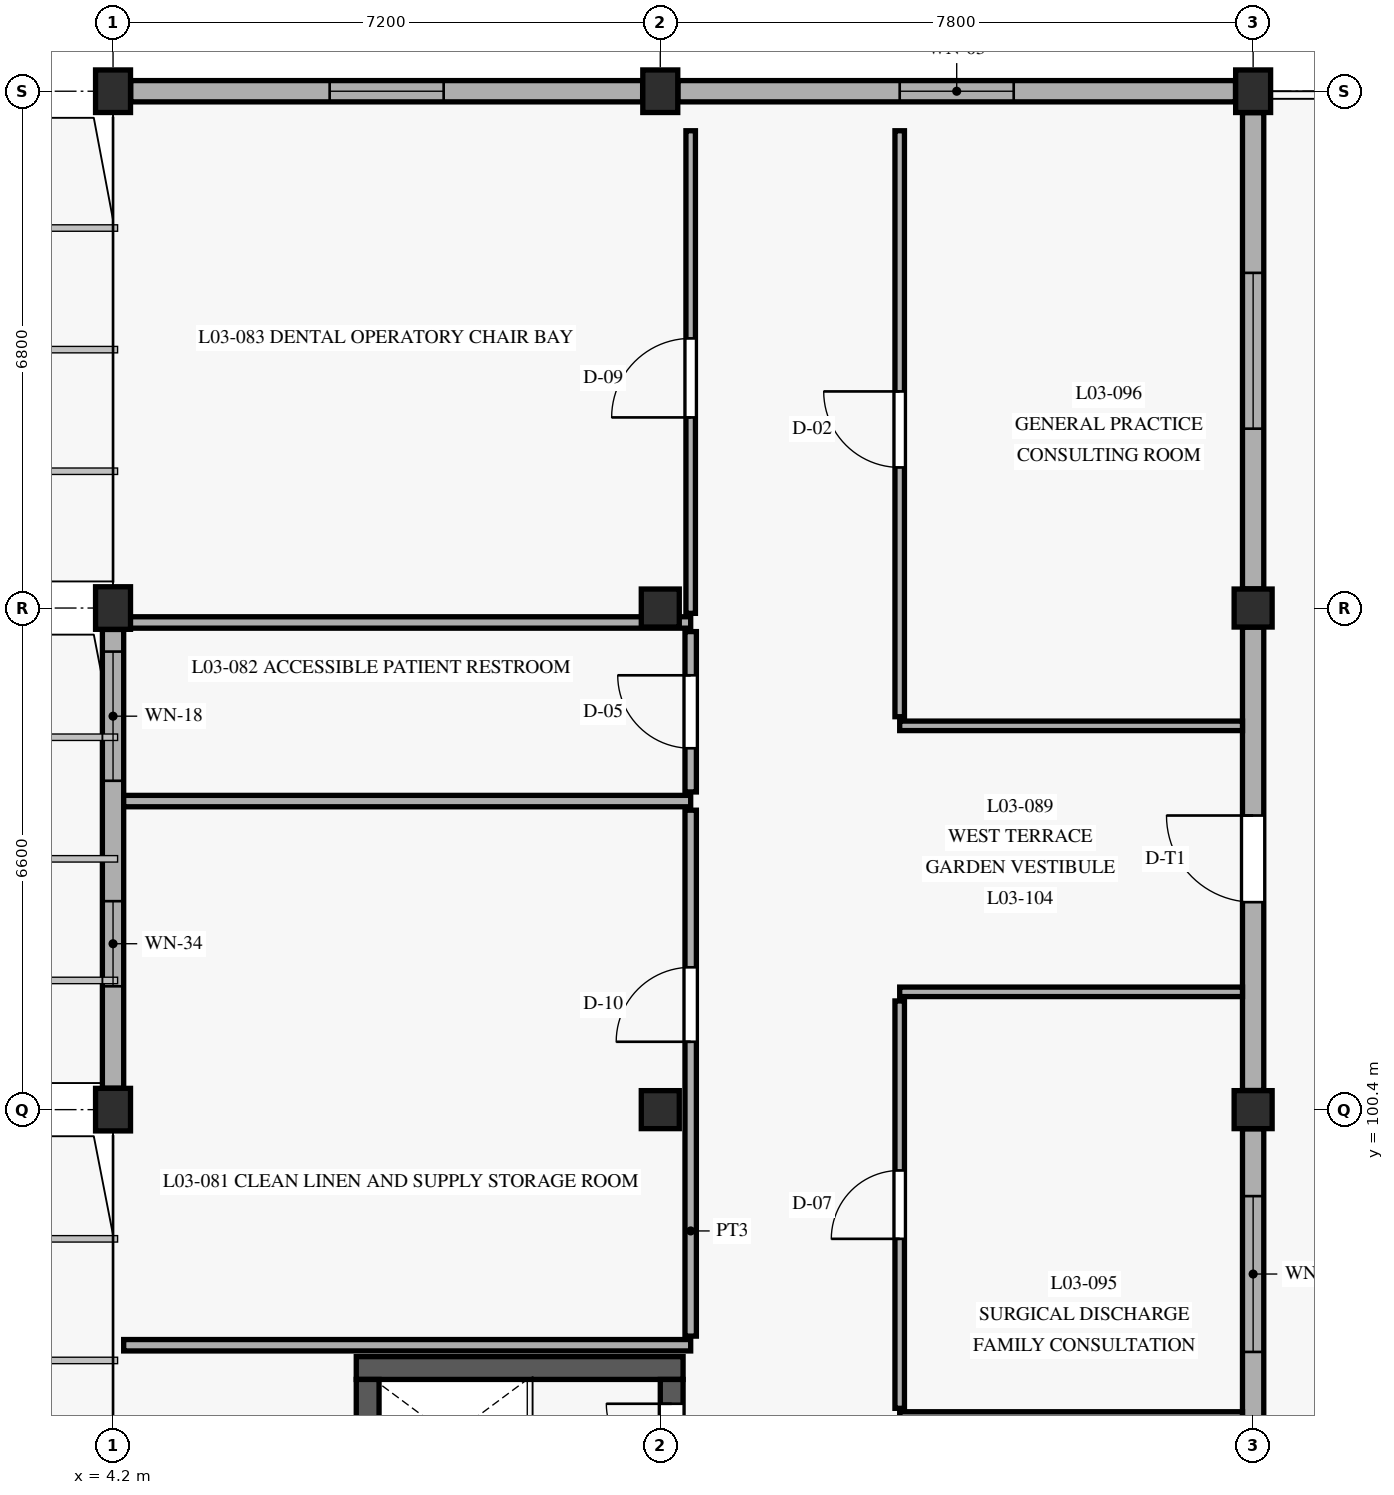
"""IFC4 building model, lengths in metres.
Left out: names, types, materials, properties, quantities, classifications, styles, units other than length and angle.
Written with IfcOpenShell. Run it as: python <this file> out.ifc"""

import sys

from ifc_helpers import new_model, si_unit, direction, frame, frame_2d, origin, origin_with_axes, origin_2d, place, context, subcontext, project, spatial, rectangle, extrude, element, fill, save


model = new_model("IFC4")
c1 = context("Model", 3, precision=1e-05, world=origin(), true_north=direction((0.0, 1.0)))
c2 = subcontext(c1, "Body", "Model", "MODEL_VIEW")
j1 = project(units=[si_unit("LENGTHUNIT", "METRE"), si_unit("PLANEANGLEUNIT", "RADIAN")], contexts=[c1])
p1 = place(None, origin())
s1 = spatial("IfcSite", under=j1, at=p1, CompositionType="ELEMENT")
p2 = place(p1, origin())
s2 = spatial("IfcBuilding", under=s1, at=p2, CompositionType="ELEMENT")
p3 = place(p2, frame((0.0, 0.0, 9.3)))
s3 = spatial("IfcBuildingStorey", under=s2, at=p3, CompositionType="ELEMENT", Elevation=9.3)
for number, where, z_axis, x_axis in (
    (1, (4.2, 100.4, 0.0), (0.0, 0.0, 1.0), (1.0, 0.0, 0.0)),
    (2, (4.2, 107.0, 0.0), (0.0, 0.0, 1.0), (1.0, 0.0, 0.0)),
    (3, (4.2, 113.8, 0.0), (0.0, 0.0, 1.0), (1.0, 0.0, 0.0)),
):
    element("IfcColumn", number, at=place(p3, frame(where, z_axis=z_axis, x_axis=x_axis)), inside=s3, PredefinedType="COLUMN", context=c2, shape_type="SweptSolid", body=[
        extrude(rectangle(XDim=0.46, YDim=0.56, at=origin_2d()), origin(), (0.0, 0.0, 1.0), 4.2),
    ])
for number, where, z_axis, x_axis in (
    (4, (11.4, 100.4, 0.0), (0.0, 0.0, 1.0), (1.0, 0.0, 0.0)),
    (5, (11.4, 107.0, 0.0), (0.0, 0.0, 1.0), (1.0, 0.0, 0.0)),
):
    element("IfcColumn", number, at=place(p3, frame(where, z_axis=z_axis, x_axis=x_axis)), inside=s3, PredefinedType="COLUMN", context=c2, shape_type="SweptSolid", body=[
        extrude(rectangle(XDim=0.5, YDim=0.5, at=origin_2d()), origin(), (0.0, 0.0, 1.0), 4.2),
    ])
p4 = place(p3, frame((11.4, 113.8, 0.0), z_axis=(0.0, 0.0, 1.0), x_axis=(1.0, 0.0, 0.0)))
e6 = element("IfcColumn", 6, at=p4, inside=s3, PredefinedType="COLUMN", context=c2, shape_type="SweptSolid", body=[
    extrude(rectangle(XDim=0.46, YDim=0.56, at=origin_2d()), origin(), (0.0, 0.0, 1.0), 4.2),
])
for number, where, z_axis, x_axis in (
    (7, (19.2, 100.4, 0.0), (0.0, 0.0, 1.0), (1.0, 0.0, 0.0)),
    (8, (19.2, 107.0, 0.0), (0.0, 0.0, 1.0), (1.0, 0.0, 0.0)),
):
    element("IfcColumn", number, at=place(p3, frame(where, z_axis=z_axis, x_axis=x_axis)), inside=s3, PredefinedType="COLUMN", context=c2, shape_type="SweptSolid", body=[
        extrude(rectangle(XDim=0.5, YDim=0.5, at=origin_2d()), origin(), (0.0, 0.0, 1.0), 4.2),
    ])
p5 = place(p3, frame((19.2, 113.8, 0.0), z_axis=(0.0, 0.0, 1.0), x_axis=(1.0, 0.0, 0.0)))
e9 = element("IfcColumn", 9, at=p5, inside=s3, PredefinedType="COLUMN", context=c2, shape_type="SweptSolid", body=[
    extrude(rectangle(XDim=0.46, YDim=0.56, at=origin_2d()), origin(), (0.0, 0.0, 1.0), 4.2),
])
p6 = place(p3, frame((11.7, 97.0, 0.0), z_axis=(0.0, 0.0, 1.0), x_axis=(-1.0, 0.0, 0.0)))
e10 = element("IfcWall", 10, at=p6, inside=s3, PredefinedType="SHEAR", context=c2, shape_type="SweptSolid", body=[
    extrude(rectangle(XDim=4.3, YDim=0.3, at=frame_2d((2.15, 0.0))), origin(), (0.0, 0.0, 1.0), 3.9),
])
p7 = place(p3, frame((7.55, 96.85, 0.0), z_axis=(0.0, 0.0, 1.0), x_axis=(0.0, -1.0, 0.0)))
e11 = element("IfcWall", 11, at=p7, inside=s3, PredefinedType="SHEAR", context=c2, shape_type="SweptSolid", body=[
    extrude(rectangle(XDim=8.7, YDim=0.3, at=frame_2d((4.35, 0.0))), origin(), (0.0, 0.0, 1.0), 3.9),
])
p8 = place(p3, frame((11.55, 88.15, 0.0), z_axis=(0.0, 0.0, 1.0), x_axis=(0.0, 1.0, 0.0)))
e12 = element("IfcWall", 12, at=p8, inside=s3, PredefinedType="SHEAR", context=c2, shape_type="SweptSolid", body=[
    extrude(rectangle(XDim=8.7, YDim=0.3, at=frame_2d((4.35, 0.0))), origin(), (0.0, 0.0, 1.0), 3.9),
])
p9 = place(p8, frame((0.2, 0.0, 0.0)))
e13 = element("IfcOpeningElement", 13, at=p9, cuts=e12, PredefinedType="OPENING", context=c2, shape_type="SweptSolid", body=[
    extrude(rectangle(XDim=1.1, YDim=2.2, at=frame_2d((0.55, 1.1))), frame((0.0, 0.16, 0.0), z_axis=(0.0, -1.0, 0.0), x_axis=(1.0, 0.0, 0.0)), (0.0, 0.0, 1.0), 0.32),
])
p10 = place(p8, frame((7.52, 0.0, 0.0)))
e14 = element("IfcOpeningElement", 14, at=p10, cuts=e12, PredefinedType="OPENING", context=c2, shape_type="SweptSolid", body=[
    extrude(rectangle(XDim=0.86, YDim=2.05, at=frame_2d((0.43, 1.025))), frame((0.0, 0.16, 0.0), z_axis=(0.0, -1.0, 0.0), x_axis=(1.0, 0.0, 0.0)), (0.0, 0.0, 1.0), 0.32),
])
p11 = place(p3, frame((4.2, 106.718, 0.0), z_axis=(0.0, 0.0, 1.0), x_axis=(0.0, -1.0, 0.0)))
e15 = element("IfcWall", 15, at=p11, inside=s3, PredefinedType="SOLIDWALL", context=c2, shape_type="SweptSolid", body=[
    extrude(rectangle(XDim=6.036, YDim=0.28, at=frame_2d((3.018, 0.0))), origin(), (0.0, 0.0, 1.0), 3.48),
])
p12 = place(p11, frame((0.291, 0.0, 0.88)))
e16 = element("IfcOpeningElement", 16, at=p12, cuts=e15, PredefinedType="OPENING", context=c2, shape_type="SweptSolid", body=[
    extrude(rectangle(XDim=1.7, YDim=1.7, at=frame_2d((0.85, 0.85))), frame((0.0, 0.15, 0.0), z_axis=(0.0, -1.0, 0.0), x_axis=(1.0, 0.0, 0.0)), (0.0, 0.0, 1.0), 0.3),
])
p13 = place(p11, frame((3.575, 0.0, 0.88)))
e17 = element("IfcOpeningElement", 17, at=p13, cuts=e15, PredefinedType="OPENING", context=c2, shape_type="SweptSolid", body=[
    extrude(rectangle(XDim=1.12, YDim=1.95, at=frame_2d((0.56, 0.975))), frame((0.0, 0.15, 0.0), z_axis=(0.0, -1.0, 0.0), x_axis=(1.0, 0.0, 0.0)), (0.0, 0.0, 1.0), 0.3),
])
p14 = place(p3, frame((19.2, 94.052, 0.0), z_axis=(0.0, 0.0, 1.0), x_axis=(0.0, 1.0, 0.0)))
e18 = element("IfcWall", 18, at=p14, inside=s3, PredefinedType="SOLIDWALL", context=c2, shape_type="SweptSolid", body=[
    extrude(rectangle(XDim=6.096, YDim=0.28, at=frame_2d((3.048, 0.0))), origin(), (0.0, 0.0, 1.0), 3.57),
])
p15 = place(p14, frame((3.16, 0.0, 0.8)))
e19 = element("IfcOpeningElement", 19, at=p15, cuts=e18, PredefinedType="OPENING", context=c2, shape_type="SweptSolid", body=[
    extrude(rectangle(XDim=2.05, YDim=1.95, at=frame_2d((1.025, 0.975))), frame((0.0, 0.15, 0.0), z_axis=(0.0, -1.0, 0.0), x_axis=(1.0, 0.0, 0.0)), (0.0, 0.0, 1.0), 0.3),
])
p16 = place(p3, frame((19.2, 100.652, 0.0), z_axis=(0.0, 0.0, 1.0), x_axis=(0.0, 1.0, 0.0)))
e20 = element("IfcWall", 20, at=p16, inside=s3, PredefinedType="SOLIDWALL", context=c2, shape_type="SweptSolid", body=[
    extrude(rectangle(XDim=6.096, YDim=0.28, at=frame_2d((3.048, 0.0))), origin(), (0.0, 0.0, 1.0), 3.57),
])
p17 = place(p16, frame((2.478, 0.0, 0.0)))
e21 = element("IfcOpeningElement", 21, at=p17, cuts=e20, PredefinedType="OPENING", context=c2, shape_type="SweptSolid", body=[
    extrude(rectangle(XDim=1.14, YDim=2.3, at=frame_2d((0.57, 1.15))), frame((0.0, 0.15, 0.0), z_axis=(0.0, -1.0, 0.0), x_axis=(1.0, 0.0, 0.0)), (0.0, 0.0, 1.0), 0.3),
])
p18 = place(p3, frame((19.2, 107.252, 0.0), z_axis=(0.0, 0.0, 1.0), x_axis=(0.0, 1.0, 0.0)))
e22 = element("IfcWall", 22, at=p18, inside=s3, PredefinedType="SOLIDWALL", context=c2, shape_type="SweptSolid", body=[
    extrude(rectangle(XDim=6.266, YDim=0.28, at=frame_2d((3.133, 0.0))), origin(), (0.0, 0.0, 1.0), 3.57),
])
p19 = place(p18, frame((2.108, 0.0, 0.8)))
e23 = element("IfcOpeningElement", 23, at=p19, cuts=e22, PredefinedType="OPENING", context=c2, shape_type="SweptSolid", body=[
    extrude(rectangle(XDim=2.05, YDim=1.95, at=frame_2d((1.025, 0.975))), frame((0.0, 0.15, 0.0), z_axis=(0.0, -1.0, 0.0), x_axis=(1.0, 0.0, 0.0)), (0.0, 0.0, 1.0), 0.3),
])
p20 = place(p3, frame((18.968, 113.8, 0.0), z_axis=(0.0, 0.0, 1.0), x_axis=(-1.0, 0.0, 0.0)))
e24 = element("IfcWall", 24, at=p20, inside=s3, PredefinedType="SOLIDWALL", context=c2, shape_type="SweptSolid", body=[
    extrude(rectangle(XDim=7.336, YDim=0.28, at=frame_2d((3.668, 0.0))), origin(), (0.0, 0.0, 1.0), 3.4),
])
p21 = place(p20, frame((2.918, 0.0, 0.9)))
e25 = element("IfcOpeningElement", 25, at=p21, cuts=e24, PredefinedType="OPENING", context=c2, shape_type="SweptSolid", body=[
    extrude(rectangle(XDim=1.5, YDim=2.2, at=frame_2d((0.75, 1.1))), frame((0.0, 0.15, 0.0), z_axis=(0.0, -1.0, 0.0), x_axis=(1.0, 0.0, 0.0)), (0.0, 0.0, 1.0), 0.3),
])
p22 = place(p3, frame((11.168, 113.8, 0.0), z_axis=(0.0, 0.0, 1.0), x_axis=(-1.0, 0.0, 0.0)))
e26 = element("IfcWall", 26, at=p22, inside=s3, PredefinedType="SOLIDWALL", context=c2, shape_type="SweptSolid", body=[
    extrude(rectangle(XDim=6.736, YDim=0.28, at=frame_2d((3.368, 0.0))), origin(), (0.0, 0.0, 1.0), 3.4),
])
p23 = place(p22, frame((2.618, 0.0, 0.9)))
e27 = element("IfcOpeningElement", 27, at=p23, cuts=e26, PredefinedType="OPENING", context=c2, shape_type="SweptSolid", body=[
    extrude(rectangle(XDim=1.5, YDim=2.2, at=frame_2d((0.75, 1.1))), frame((0.0, 0.15, 0.0), z_axis=(0.0, -1.0, 0.0), x_axis=(1.0, 0.0, 0.0)), (0.0, 0.0, 1.0), 0.3),
])
p24 = place(p3, frame((11.8, 97.42, 0.0), z_axis=(0.0, 0.0, 1.0), x_axis=(0.0, 1.0, 0.0)))
e28 = element("IfcWall", 28, at=p24, inside=s3, PredefinedType="PARTITIONING", context=c2, shape_type="SweptSolid", body=[
    extrude(rectangle(XDim=6.92, YDim=0.15, at=frame_2d((3.46, 0.0))), origin(), (0.0, 0.0, 1.0), 3.495),
])
p25 = place(p24, frame((3.873, 0.0, 0.0)))
e29 = element("IfcOpeningElement", 29, at=p25, cuts=e28, PredefinedType="OPENING", context=c2, shape_type="SweptSolid", body=[
    extrude(rectangle(XDim=0.98, YDim=2.12, at=frame_2d((0.49, 1.06))), frame((0.0, 0.085, 0.0), z_axis=(0.0, -1.0, 0.0), x_axis=(1.0, 0.0, 0.0)), (0.0, 0.0, 1.0), 0.17),
])
for number, where, z_axis, x_axis in (
    (30, (4.34, 104.46, 0.0), (0.0, 0.0, 1.0), (1.0, 0.0, 0.0)),
    (31, (4.34, 97.3, 0.0), (0.0, 0.0, 1.0), (1.0, 0.0, 0.0)),
):
    element("IfcWall", number, at=place(p3, frame(where, z_axis=z_axis, x_axis=x_axis)), inside=s3, PredefinedType="PARTITIONING", context=c2, shape_type="SweptSolid", body=[
        extrude(rectangle(XDim=7.46, YDim=0.15, at=frame_2d((3.73, 0.0))), origin(), (0.0, 0.0, 1.0), 3.475),
    ])
p26 = place(p3, frame((11.8, 104.58, 0.0), z_axis=(0.0, 0.0, 1.0), x_axis=(0.0, 1.0, 0.0)))
e32 = element("IfcWall", 32, at=p26, inside=s3, PredefinedType="PARTITIONING", context=c2, shape_type="SweptSolid", body=[
    extrude(rectangle(XDim=2.11, YDim=0.15, at=frame_2d((1.055, 0.0))), origin(), (0.0, 0.0, 1.0), 3.495),
])
p27 = place(p26, frame((0.575, 0.0, 0.0)))
e33 = element("IfcOpeningElement", 33, at=p27, cuts=e32, PredefinedType="OPENING", context=c2, shape_type="SweptSolid", body=[
    extrude(rectangle(XDim=0.96, YDim=2.1, at=frame_2d((0.48, 1.05))), frame((0.0, 0.085, 0.0), z_axis=(0.0, -1.0, 0.0), x_axis=(1.0, 0.0, 0.0)), (0.0, 0.0, 1.0), 0.17),
])
p28 = place(p3, frame((4.34, 106.81, 0.0), z_axis=(0.0, 0.0, 1.0), x_axis=(1.0, 0.0, 0.0)))
e34 = element("IfcWall", 34, at=p28, inside=s3, PredefinedType="PARTITIONING", context=c2, shape_type="SweptSolid", body=[
    extrude(rectangle(XDim=7.46, YDim=0.15, at=frame_2d((3.73, 0.0))), origin(), (0.0, 0.0, 1.0), 3.475),
])
p29 = place(p3, frame((11.8, 106.93, 0.0), z_axis=(0.0, 0.0, 1.0), x_axis=(0.0, 1.0, 0.0)))
e35 = element("IfcWall", 35, at=p29, inside=s3, PredefinedType="PARTITIONING", context=c2, shape_type="SweptSolid", body=[
    extrude(rectangle(XDim=6.35, YDim=0.125, at=frame_2d((3.175, 0.0))), origin(), (0.0, 0.0, 1.0), 3.495),
])
p30 = place(p29, frame((2.578, 0.0, 0.0)))
e36 = element("IfcOpeningElement", 36, at=p30, cuts=e35, PredefinedType="OPENING", context=c2, shape_type="SweptSolid", body=[
    extrude(rectangle(XDim=1.04, YDim=2.15, at=frame_2d((0.52, 1.075))), frame((0.0, 0.073, 0.0), z_axis=(0.0, -1.0, 0.0), x_axis=(1.0, 0.0, 0.0)), (0.0, 0.0, 1.0), 0.145),
])
p31 = place(p3, frame((14.55, 96.35, 0.0), z_axis=(0.0, 0.0, 1.0), x_axis=(1.0, 0.0, 0.0)))
e37 = element("IfcWall", 37, at=p31, inside=s3, PredefinedType="PARTITIONING", context=c2, shape_type="SweptSolid", body=[
    extrude(rectangle(XDim=4.51, YDim=0.15, at=frame_2d((2.255, 0.0))), origin(), (0.0, 0.0, 1.0), 3.565),
])
p32 = place(p3, frame((14.55, 96.47, 0.0), z_axis=(0.0, 0.0, 1.0), x_axis=(0.0, 1.0, 0.0)))
e38 = element("IfcWall", 38, at=p32, inside=s3, PredefinedType="PARTITIONING", context=c2, shape_type="SweptSolid", body=[
    extrude(rectangle(XDim=5.36, YDim=0.125, at=frame_2d((2.68, 0.0))), origin(), (0.0, 0.0, 1.0), 3.495),
])
p33 = place(p32, frame((2.23, 0.0, 0.0)))
e39 = element("IfcOpeningElement", 39, at=p33, cuts=e38, PredefinedType="OPENING", context=c2, shape_type="SweptSolid", body=[
    extrude(rectangle(XDim=0.9, YDim=2.12, at=frame_2d((0.45, 1.06))), frame((0.0, 0.073, 0.0), z_axis=(0.0, -1.0, 0.0), x_axis=(1.0, 0.0, 0.0)), (0.0, 0.0, 1.0), 0.145),
])
p34 = place(p3, frame((14.55, 101.95, 0.0), z_axis=(0.0, 0.0, 1.0), x_axis=(1.0, 0.0, 0.0)))
e40 = element("IfcWall", 40, at=p34, inside=s3, PredefinedType="PARTITIONING", context=c2, shape_type="SweptSolid", body=[
    extrude(rectangle(XDim=4.51, YDim=0.125, at=frame_2d((2.255, 0.0))), origin(), (0.0, 0.0, 1.0), 3.565),
])
p35 = place(p3, frame((14.55, 105.57, 0.0), z_axis=(0.0, 0.0, 1.0), x_axis=(0.0, 1.0, 0.0)))
e41 = element("IfcWall", 41, at=p35, inside=s3, PredefinedType="PARTITIONING", context=c2, shape_type="SweptSolid", body=[
    extrude(rectangle(XDim=7.71, YDim=0.125, at=frame_2d((3.855, 0.0))), origin(), (0.0, 0.0, 1.0), 3.495),
])
p36 = place(p35, frame((3.28, 0.0, 0.0)))
e42 = element("IfcOpeningElement", 42, at=p36, cuts=e41, PredefinedType="OPENING", context=c2, shape_type="SweptSolid", body=[
    extrude(rectangle(XDim=1.0, YDim=2.15, at=frame_2d((0.5, 1.075))), frame((0.0, 0.073, 0.0), z_axis=(0.0, -1.0, 0.0), x_axis=(1.0, 0.0, 0.0)), (0.0, 0.0, 1.0), 0.145),
])
p37 = place(p3, frame((14.55, 105.45, 0.0), z_axis=(0.0, 0.0, 1.0), x_axis=(1.0, 0.0, 0.0)))
e43 = element("IfcWall", 43, at=p37, inside=s3, PredefinedType="PARTITIONING", context=c2, shape_type="SweptSolid", body=[
    extrude(rectangle(XDim=4.51, YDim=0.125, at=frame_2d((2.255, 0.0))), origin(), (0.0, 0.0, 1.0), 3.565),
])
p38 = place(p10, origin_with_axes())
e44 = element("IfcDoor", 44, at=p38, inside=s3, OperationType="SINGLE_SWING_RIGHT", PredefinedType="DOOR", context=c2, shape_type="SweptSolid", body=[
    extrude(rectangle(XDim=0.86, YDim=2.05, at=frame_2d((0.43, 1.025))), frame((0.0, 0.025, 0.0), z_axis=(0.0, -1.0, 0.0), x_axis=(1.0, 0.0, 0.0)), (0.0, 0.0, 1.0), 0.05),
])
fill(e14, e44)
p39 = place(p12, origin_with_axes())
e45 = element("IfcWindow", 45, at=p39, inside=s3, PartitioningType="SINGLE_PANEL", PredefinedType="WINDOW", context=c2, shape_type="SweptSolid", body=[
    extrude(rectangle(XDim=1.7, YDim=1.7, at=frame_2d((0.85, 0.85))), frame((0.0, 0.03, 0.0), z_axis=(0.0, -1.0, 0.0), x_axis=(1.0, 0.0, 0.0)), (0.0, 0.0, 1.0), 0.06),
])
fill(e16, e45)
p40 = place(p13, origin_with_axes())
e46 = element("IfcWindow", 46, at=p40, inside=s3, PartitioningType="SINGLE_PANEL", PredefinedType="WINDOW", context=c2, shape_type="SweptSolid", body=[
    extrude(rectangle(XDim=1.12, YDim=1.95, at=frame_2d((0.56, 0.975))), frame((0.0, 0.03, 0.0), z_axis=(0.0, -1.0, 0.0), x_axis=(1.0, 0.0, 0.0)), (0.0, 0.0, 1.0), 0.06),
])
fill(e17, e46)
p41 = place(p15, origin_with_axes())
e47 = element("IfcWindow", 47, at=p41, inside=s3, PartitioningType="SINGLE_PANEL", PredefinedType="WINDOW", context=c2, shape_type="SweptSolid", body=[
    extrude(rectangle(XDim=2.05, YDim=1.95, at=frame_2d((1.025, 0.975))), frame((0.0, 0.03, 0.0), z_axis=(0.0, -1.0, 0.0), x_axis=(1.0, 0.0, 0.0)), (0.0, 0.0, 1.0), 0.06),
])
fill(e19, e47)
p42 = place(p17, frame((1.14, 0.0, 0.0), z_axis=(0.0, 0.0, 1.0), x_axis=(-1.0, 0.0, 0.0)))
e48 = element("IfcDoor", 48, at=p42, inside=s3, OperationType="SINGLE_SWING_LEFT", PredefinedType="DOOR", context=c2, shape_type="SweptSolid", body=[
    extrude(rectangle(XDim=1.14, YDim=2.3, at=frame_2d((0.57, 1.15))), frame((0.0, 0.025, 0.0), z_axis=(0.0, -1.0, 0.0), x_axis=(1.0, 0.0, 0.0)), (0.0, 0.0, 1.0), 0.05),
])
fill(e21, e48)
p43 = place(p19, origin_with_axes())
e49 = element("IfcWindow", 49, at=p43, inside=s3, PartitioningType="SINGLE_PANEL", PredefinedType="WINDOW", context=c2, shape_type="SweptSolid", body=[
    extrude(rectangle(XDim=2.05, YDim=1.95, at=frame_2d((1.025, 0.975))), frame((0.0, 0.03, 0.0), z_axis=(0.0, -1.0, 0.0), x_axis=(1.0, 0.0, 0.0)), (0.0, 0.0, 1.0), 0.06),
])
fill(e23, e49)
p44 = place(p21, origin_with_axes())
e50 = element("IfcWindow", 50, at=p44, inside=s3, PartitioningType="SINGLE_PANEL", PredefinedType="WINDOW", context=c2, shape_type="SweptSolid", body=[
    extrude(rectangle(XDim=1.5, YDim=2.2, at=frame_2d((0.75, 1.1))), frame((0.0, 0.03, 0.0), z_axis=(0.0, -1.0, 0.0), x_axis=(1.0, 0.0, 0.0)), (0.0, 0.0, 1.0), 0.06),
])
fill(e25, e50)
p45 = place(p23, origin_with_axes())
e51 = element("IfcWindow", 51, at=p45, inside=s3, PartitioningType="SINGLE_PANEL", PredefinedType="WINDOW", context=c2, shape_type="SweptSolid", body=[
    extrude(rectangle(XDim=1.5, YDim=2.2, at=frame_2d((0.75, 1.1))), frame((0.0, 0.03, 0.0), z_axis=(0.0, -1.0, 0.0), x_axis=(1.0, 0.0, 0.0)), (0.0, 0.0, 1.0), 0.06),
])
fill(e27, e51)
p46 = place(p25, origin_with_axes())
e52 = element("IfcDoor", 52, at=p46, inside=s3, OperationType="SINGLE_SWING_LEFT", PredefinedType="DOOR", context=c2, shape_type="SweptSolid", body=[
    extrude(rectangle(XDim=0.98, YDim=2.12, at=frame_2d((0.49, 1.06))), frame((0.0, 0.025, 0.0), z_axis=(0.0, -1.0, 0.0), x_axis=(1.0, 0.0, 0.0)), (0.0, 0.0, 1.0), 0.05),
])
fill(e29, e52)
p47 = place(p27, origin_with_axes())
e53 = element("IfcDoor", 53, at=p47, inside=s3, OperationType="SINGLE_SWING_RIGHT", PredefinedType="DOOR", context=c2, shape_type="SweptSolid", body=[
    extrude(rectangle(XDim=0.96, YDim=2.1, at=frame_2d((0.48, 1.05))), frame((0.0, 0.025, 0.0), z_axis=(0.0, -1.0, 0.0), x_axis=(1.0, 0.0, 0.0)), (0.0, 0.0, 1.0), 0.05),
])
fill(e33, e53)
p48 = place(p30, origin_with_axes())
e54 = element("IfcDoor", 54, at=p48, inside=s3, OperationType="SINGLE_SWING_LEFT", PredefinedType="DOOR", context=c2, shape_type="SweptSolid", body=[
    extrude(rectangle(XDim=1.04, YDim=2.15, at=frame_2d((0.52, 1.075))), frame((0.0, 0.025, 0.0), z_axis=(0.0, -1.0, 0.0), x_axis=(1.0, 0.0, 0.0)), (0.0, 0.0, 1.0), 0.05),
])
fill(e36, e54)
p49 = place(p33, frame((0.9, 0.0, 0.0), z_axis=(0.0, 0.0, 1.0), x_axis=(-1.0, 0.0, 0.0)))
e55 = element("IfcDoor", 55, at=p49, inside=s3, OperationType="SINGLE_SWING_RIGHT", PredefinedType="DOOR", context=c2, shape_type="SweptSolid", body=[
    extrude(rectangle(XDim=0.9, YDim=2.12, at=frame_2d((0.45, 1.06))), frame((0.0, 0.025, 0.0), z_axis=(0.0, -1.0, 0.0), x_axis=(1.0, 0.0, 0.0)), (0.0, 0.0, 1.0), 0.05),
])
fill(e39, e55)
p50 = place(p36, frame((1.0, 0.0, 0.0), z_axis=(0.0, 0.0, 1.0), x_axis=(-1.0, 0.0, 0.0)))
e56 = element("IfcDoor", 56, at=p50, inside=s3, OperationType="SINGLE_SWING_LEFT", PredefinedType="DOOR", context=c2, shape_type="SweptSolid", body=[
    extrude(rectangle(XDim=1.0, YDim=2.15, at=frame_2d((0.5, 1.075))), frame((0.0, 0.025, 0.0), z_axis=(0.0, -1.0, 0.0), x_axis=(1.0, 0.0, 0.0)), (0.0, 0.0, 1.0), 0.05),
])
fill(e42, e56)
save(model, sys.argv[1])
